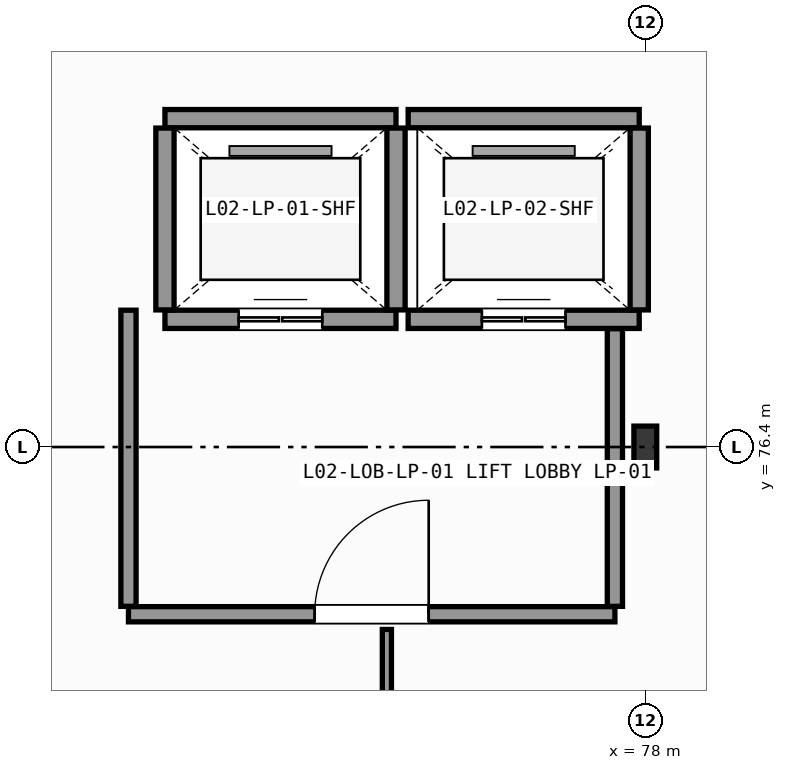
"""IFC4 building model, lengths in metres.
Left out: names, types, materials, properties, quantities, classifications, styles, units other than length and angle.
Written with IfcOpenShell. Run it as: python <this file> out.ifc"""

import sys

from ifc_helpers import new_model, si_unit, direction, frame, frame_2d, origin, origin_2d, place, context, subcontext, project, spatial, rectangle, i_section, extrude, element, fill, save


model = new_model("IFC4")
c1 = context("Model", 3, precision=1e-05, world=origin(), true_north=direction((0.0, 1.0)))
c2 = subcontext(c1, "Body", "Model", "MODEL_VIEW")
j1 = project(units=[si_unit("LENGTHUNIT", "METRE"), si_unit("PLANEANGLEUNIT", "RADIAN")], contexts=[c1])
p1 = place(None, origin())
s1 = spatial("IfcSite", under=j1, at=p1, CompositionType="ELEMENT")
p2 = place(p1, origin())
s2 = spatial("IfcBuilding", under=s1, at=p2, CompositionType="ELEMENT")
p3 = place(p2, frame((0.0, 0.0, 7.8)))
s3 = spatial("IfcBuildingStorey", under=s2, at=p3, CompositionType="ELEMENT", Elevation=7.8)
p4 = place(p3, frame((78.0, 76.4, 0.0), z_axis=(0.0, 0.0, 1.0), x_axis=(1.0, 0.0, 0.0)))
e1 = element("IfcColumn", 1, at=p4, inside=s3, PredefinedType="COLUMN", context=c2, shape_type="SweptSolid", body=[
    extrude(i_section(OverallWidth=0.3, OverallDepth=0.55, WebThickness=0.015, FlangeThickness=0.029, FilletRadius=0.027, at=origin_2d()), origin(), (0.0, 0.0, 1.0), 5.4),
])
p5 = place(p3, frame((71.68, 78.08, 0.0), z_axis=(0.0, 0.0, 1.0), x_axis=(1.0, 0.0, 0.0)))
e2 = element("IfcWall", 2, at=p5, inside=s3, PredefinedType="SHEAR", context=c2, shape_type="SweptSolid", body=[
    extrude(rectangle(XDim=3.04, YDim=0.24, at=frame_2d((1.52, 0.0))), origin(), (0.0, 0.0, 1.0), 5.15),
])
p6 = place(p5, frame((0.97, 0.0, 0.0)))
e3 = element("IfcOpeningElement", 3, at=p6, cuts=e2, PredefinedType="OPENING", context=c2, shape_type="SweptSolid", body=[
    extrude(rectangle(XDim=1.1, YDim=2.2, at=frame_2d((0.55, 1.1))), frame((0.0, 0.13, 0.0), z_axis=(0.0, -1.0, 0.0), x_axis=(1.0, 0.0, 0.0)), (0.0, 0.0, 1.0), 0.26),
])
p7 = place(p3, frame((71.68, 80.72, 0.0), z_axis=(0.0, 0.0, 1.0), x_axis=(1.0, 0.0, 0.0)))
e4 = element("IfcWall", 4, at=p7, inside=s3, PredefinedType="SHEAR", context=c2, shape_type="SweptSolid", body=[
    extrude(rectangle(XDim=3.04, YDim=0.24, at=frame_2d((1.52, 0.0))), origin(), (0.0, 0.0, 1.0), 5.15),
])
for number, where, z_axis, x_axis in (
    (5, (71.68, 78.204, 0.0), (0.0, 0.0, 1.0), (0.0, 1.0, 0.0)),
    (6, (74.72, 78.204, 0.0), (0.0, 0.0, 1.0), (0.0, 1.0, 0.0)),
):
    element("IfcWall", number, at=place(p3, frame(where, z_axis=z_axis, x_axis=x_axis)), inside=s3, PredefinedType="SHEAR", context=c2, shape_type="SweptSolid", body=[
        extrude(rectangle(XDim=2.392, YDim=0.24, at=frame_2d((1.196, 0.0))), origin(), (0.0, 0.0, 1.0), 5.15),
    ])
p8 = place(p3, frame((74.88, 78.08, 0.0), z_axis=(0.0, 0.0, 1.0), x_axis=(1.0, 0.0, 0.0)))
e7 = element("IfcWall", 7, at=p8, inside=s3, PredefinedType="SHEAR", context=c2, shape_type="SweptSolid", body=[
    extrude(rectangle(XDim=3.04, YDim=0.24, at=frame_2d((1.52, 0.0))), origin(), (0.0, 0.0, 1.0), 5.15),
])
p9 = place(p8, frame((0.97, 0.0, 0.0)))
e8 = element("IfcOpeningElement", 8, at=p9, cuts=e7, PredefinedType="OPENING", context=c2, shape_type="SweptSolid", body=[
    extrude(rectangle(XDim=1.1, YDim=2.2, at=frame_2d((0.55, 1.1))), frame((0.0, 0.13, 0.0), z_axis=(0.0, -1.0, 0.0), x_axis=(1.0, 0.0, 0.0)), (0.0, 0.0, 1.0), 0.26),
])
p10 = place(p3, frame((74.88, 80.72, 0.0), z_axis=(0.0, 0.0, 1.0), x_axis=(1.0, 0.0, 0.0)))
e9 = element("IfcWall", 9, at=p10, inside=s3, PredefinedType="SHEAR", context=c2, shape_type="SweptSolid", body=[
    extrude(rectangle(XDim=3.04, YDim=0.24, at=frame_2d((1.52, 0.0))), origin(), (0.0, 0.0, 1.0), 5.15),
])
p11 = place(p3, frame((77.92, 78.204, 0.0), z_axis=(0.0, 0.0, 1.0), x_axis=(0.0, 1.0, 0.0)))
e10 = element("IfcWall", 10, at=p11, inside=s3, PredefinedType="SHEAR", context=c2, shape_type="SweptSolid", body=[
    extrude(rectangle(XDim=2.392, YDim=0.24, at=frame_2d((1.196, 0.0))), origin(), (0.0, 0.0, 1.0), 5.15),
])
p12 = place(p3, frame((71.2, 74.2, 0.0), z_axis=(0.0, 0.0, 1.0), x_axis=(1.0, 0.0, 0.0)))
e11 = element("IfcWall", 11, at=p12, inside=s3, PredefinedType="PARTITIONING", context=c2, shape_type="SweptSolid", body=[
    extrude(rectangle(XDim=6.4, YDim=0.2, at=frame_2d((3.2, 0.0))), origin(), (0.0, 0.0, 1.0), 5.15),
])
p13 = place(p12, frame((2.45, 0.0, 0.0)))
e12 = element("IfcOpeningElement", 12, at=p13, cuts=e11, PredefinedType="OPENING", context=c2, shape_type="SweptSolid", body=[
    extrude(rectangle(XDim=1.5, YDim=2.2, at=frame_2d((0.75, 1.1))), frame((0.0, 0.11, 0.0), z_axis=(0.0, -1.0, 0.0), x_axis=(1.0, 0.0, 0.0)), (0.0, 0.0, 1.0), 0.22),
])
p14 = place(p3, frame((71.2, 74.304, 0.0), z_axis=(0.0, 0.0, 1.0), x_axis=(0.0, 1.0, 0.0)))
e13 = element("IfcWall", 13, at=p14, inside=s3, PredefinedType="PARTITIONING", context=c2, shape_type="SweptSolid", body=[
    extrude(rectangle(XDim=3.896, YDim=0.2, at=frame_2d((1.948, 0.0))), origin(), (0.0, 0.0, 1.0), 5.15),
])
p15 = place(p3, frame((77.6, 74.304, 0.0), z_axis=(0.0, 0.0, 1.0), x_axis=(0.0, 1.0, 0.0)))
e14 = element("IfcWall", 14, at=p15, inside=s3, PredefinedType="PARTITIONING", context=c2, shape_type="SweptSolid", body=[
    extrude(rectangle(XDim=3.652, YDim=0.2, at=frame_2d((1.826, 0.0))), origin(), (0.0, 0.0, 1.0), 5.15),
])
p16 = place(p3, frame((74.6, 61.479, 0.0), z_axis=(0.0, 0.0, 1.0), x_axis=(0.0, 1.0, 0.0)))
e15 = element("IfcWall", 15, at=p16, inside=s3, PredefinedType="PARTITIONING", context=c2, shape_type="SweptSolid", body=[
    extrude(rectangle(XDim=12.521, YDim=0.12, at=frame_2d((6.26, 0.0))), origin(), (0.0, 0.0, 1.0), 5.15),
])
p17 = place(p16, frame((5.16, 0.0, 0.0)))
e16 = element("IfcOpeningElement", 16, at=p17, cuts=e15, PredefinedType="OPENING", context=c2, shape_type="SweptSolid", body=[
    extrude(rectangle(XDim=2.2, YDim=2.6, at=frame_2d((1.1, 1.3))), frame((0.0, 0.07, 0.0), z_axis=(0.0, -1.0, 0.0), x_axis=(1.0, 0.0, 0.0)), (0.0, 0.0, 1.0), 0.14),
])
p18 = place(p6, origin())
e17 = element("IfcDoor", 17, at=p18, inside=s3, OperationType="DOUBLE_DOOR_SLIDING", PredefinedType="DOOR", context=c2, shape_type="SweptSolid", body=[
    extrude(rectangle(XDim=1.1, YDim=2.2, at=frame_2d((0.55, 1.1))), frame((0.0, 0.025, 0.0), z_axis=(0.0, -1.0, 0.0), x_axis=(1.0, 0.0, 0.0)), (0.0, 0.0, 1.0), 0.05),
])
fill(e3, e17)
p19 = place(p9, origin())
e18 = element("IfcDoor", 18, at=p19, inside=s3, OperationType="DOUBLE_DOOR_SLIDING", PredefinedType="DOOR", context=c2, shape_type="SweptSolid", body=[
    extrude(rectangle(XDim=1.1, YDim=2.2, at=frame_2d((0.55, 1.1))), frame((0.0, 0.025, 0.0), z_axis=(0.0, -1.0, 0.0), x_axis=(1.0, 0.0, 0.0)), (0.0, 0.0, 1.0), 0.05),
])
fill(e8, e18)
p20 = place(p13, origin())
e19 = element("IfcDoor", 19, at=p20, inside=s3, OperationType="SINGLE_SWING_RIGHT", PredefinedType="DOOR", context=c2, shape_type="SweptSolid", body=[
    extrude(rectangle(XDim=1.5, YDim=2.2, at=frame_2d((0.75, 1.1))), frame((0.0, 0.025, 0.0), z_axis=(0.0, -1.0, 0.0), x_axis=(1.0, 0.0, 0.0)), (0.0, 0.0, 1.0), 0.05),
])
fill(e12, e19)
save(model, sys.argv[1])
